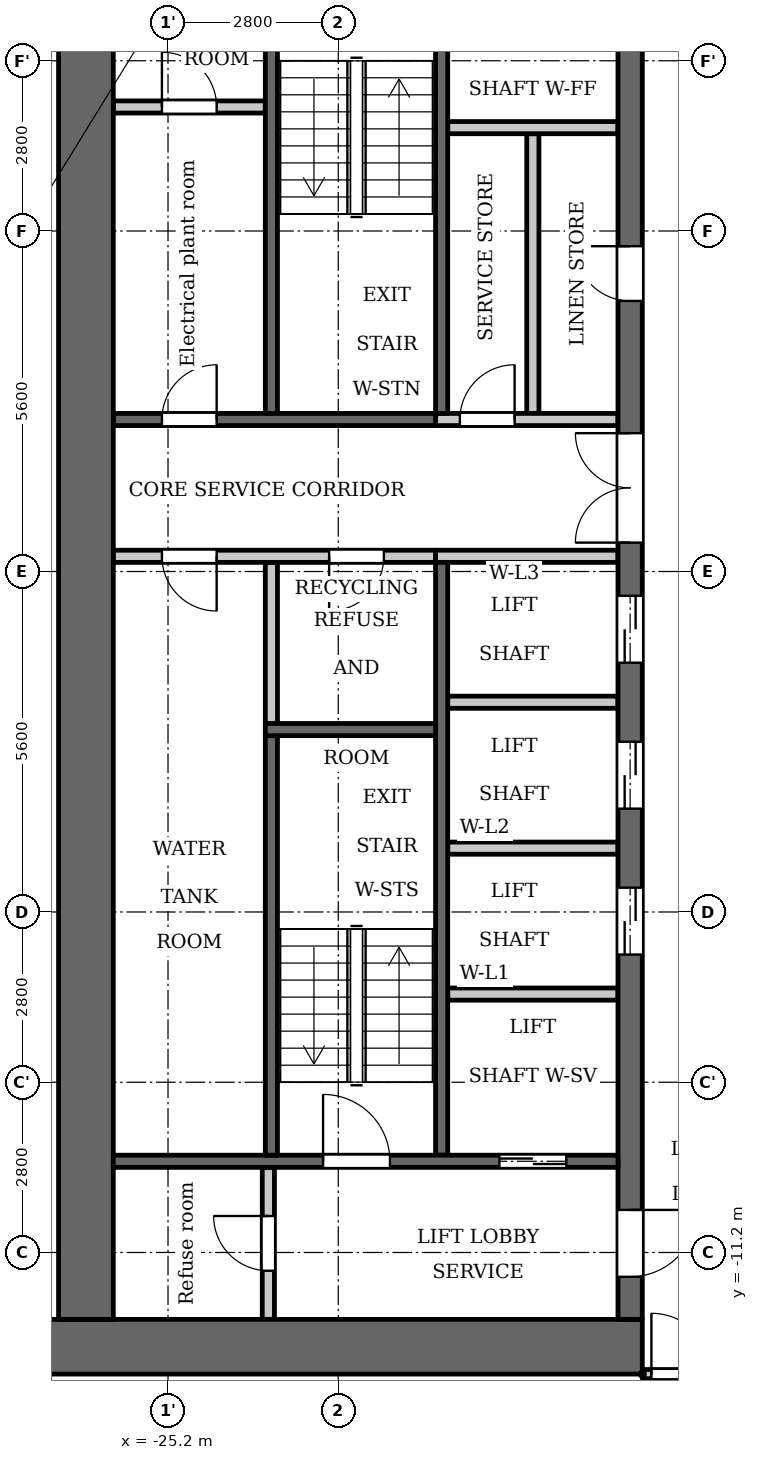
"""IFC4 building model, lengths in metres.
Left out: names, types, materials, properties, quantities, classifications, styles, units other than length and angle.
Written with IfcOpenShell. Run it as: python <this file> out.ifc"""

import sys

from ifc_helpers import new_model, si_unit, direction, frame, frame_2d, origin, place, context, subcontext, project, spatial, rectangle, extrude, element, fill, save


model = new_model("IFC4")
c1 = context("Model", 3, precision=1e-05, world=origin(), true_north=direction((0.0, 1.0)))
c2 = subcontext(c1, "Body", "Model", "MODEL_VIEW")
j1 = project(units=[si_unit("LENGTHUNIT", "METRE"), si_unit("PLANEANGLEUNIT", "RADIAN")], contexts=[c1])
p1 = place(None, origin())
s1 = spatial("IfcSite", under=j1, at=p1, CompositionType="ELEMENT")
p2 = place(p1, origin())
s2 = spatial("IfcBuilding", under=s1, at=p2, CompositionType="ELEMENT")
p3 = place(p2, frame((0.0, 0.0, 104.3)))
s3 = spatial("IfcBuildingStorey", under=s2, at=p3, CompositionType="ELEMENT", Elevation=104.3)
p4 = place(p3, frame((-23.5, -2.5, 0.0), z_axis=(0.0, 0.0, 1.0), x_axis=(0.0, 1.0, 0.0)))
e1 = element("IfcWall", 1, at=p4, inside=s3, PredefinedType="PARTITIONING", context=c2, shape_type="SweptSolid", body=[
    extrude(rectangle(XDim=2.65, YDim=0.2, at=frame_2d((1.325, 0.0))), origin(), (0.0, 0.0, 1.0), 3.2),
])
p5 = place(p3, frame((-20.7, 2.6, 0.0), z_axis=(0.0, 0.0, 1.0), x_axis=(0.0, 1.0, 0.0)))
e2 = element("IfcWall", 2, at=p5, inside=s3, PredefinedType="SHEAR", context=c2, shape_type="SweptSolid", body=[
    extrude(rectangle(XDim=7.0, YDim=0.2, at=frame_2d((3.5, 0.0))), origin(), (0.0, 0.0, 1.0), 3.2),
])
p6 = place(p3, frame((-20.7, -9.6, 0.0), z_axis=(0.0, 0.0, 1.0), x_axis=(0.0, 1.0, 0.0)))
e3 = element("IfcWall", 3, at=p6, inside=s3, PredefinedType="SHEAR", context=c2, shape_type="SweptSolid", body=[
    extrude(rectangle(XDim=9.75, YDim=0.2, at=frame_2d((4.875, 0.0))), origin(), (0.0, 0.0, 1.0), 3.2),
])
p7 = place(p3, frame((-20.8, 2.5, 0.0), z_axis=(0.0, 0.0, 1.0), x_axis=(-1.0, 0.0, 0.0)))
e4 = element("IfcWall", 4, at=p7, inside=s3, PredefinedType="SHEAR", context=c2, shape_type="SweptSolid", body=[
    extrude(rectangle(XDim=5.3, YDim=0.2, at=frame_2d((2.65, 0.0))), origin(), (0.0, 0.0, 1.0), 3.2),
])
p8 = place(p7, frame((3.6, 0.0, 0.0)))
e5 = element("IfcOpeningElement", 5, at=p8, cuts=e4, PredefinedType="OPENING", context=c2, shape_type="SweptSolid", body=[
    extrude(rectangle(XDim=0.9, YDim=2.1, at=frame_2d((0.45, 1.05))), frame((0.0, 0.11, 0.0), z_axis=(0.0, -1.0, 0.0), x_axis=(1.0, 0.0, 0.0)), (0.0, 0.0, 1.0), 0.22),
])
p9 = place(p3, frame((-20.8, 0.25, 0.0), z_axis=(0.0, 0.0, 1.0), x_axis=(-1.0, 0.0, 0.0)))
e6 = element("IfcWall", 6, at=p9, inside=s3, PredefinedType="PARTITIONING", context=c2, shape_type="SweptSolid", body=[
    extrude(rectangle(XDim=5.3, YDim=0.2, at=frame_2d((2.65, 0.0))), origin(), (0.0, 0.0, 1.0), 3.2),
])
p10 = place(p9, frame((0.85, 0.0, 0.0)))
e7 = element("IfcOpeningElement", 7, at=p10, cuts=e6, PredefinedType="OPENING", context=c2, shape_type="SweptSolid", body=[
    extrude(rectangle(XDim=0.9, YDim=2.1, at=frame_2d((0.45, 1.05))), frame((0.0, 0.11, 0.0), z_axis=(0.0, -1.0, 0.0), x_axis=(1.0, 0.0, 0.0)), (0.0, 0.0, 1.0), 0.22),
])
p11 = place(p9, frame((3.6, 0.0, 0.0)))
e8 = element("IfcOpeningElement", 8, at=p11, cuts=e6, PredefinedType="OPENING", context=c2, shape_type="SweptSolid", body=[
    extrude(rectangle(XDim=0.9, YDim=2.1, at=frame_2d((0.45, 1.05))), frame((0.0, 0.11, 0.0), z_axis=(0.0, -1.0, 0.0), x_axis=(1.0, 0.0, 0.0)), (0.0, 0.0, 1.0), 0.22),
])
p12 = place(p3, frame((-17.4, -12.75, 0.0), z_axis=(0.0, 0.0, 1.0), x_axis=(-1.0, 0.0, 0.0)))
e9 = element("IfcWall", 9, at=p12, inside=s3, PredefinedType="SHEAR", context=c2, shape_type="SweptSolid", body=[
    extrude(rectangle(XDim=10.4, YDim=0.9, at=frame_2d((5.2, 0.0))), origin(), (0.0, 0.0, 1.0), 3.2),
])
p13 = place(p3, frame((-19.2, 2.6, 0.0), z_axis=(0.0, 0.0, 1.0), x_axis=(0.0, 1.0, 0.0)))
e10 = element("IfcWall", 10, at=p13, inside=s3, PredefinedType="PARTITIONING", context=c2, shape_type="SweptSolid", body=[
    extrude(rectangle(XDim=4.6, YDim=0.2, at=frame_2d((2.3, 0.0))), origin(), (0.0, 0.0, 1.0), 3.2),
])
p14 = place(p3, frame((-17.6, -12.3, 0.0), z_axis=(0.0, 0.0, 1.0), x_axis=(0.0, 1.0, 0.0)))
e11 = element("IfcWall", 11, at=p14, inside=s3, PredefinedType="SHEAR", context=c2, shape_type="SweptSolid", body=[
    extrude(rectangle(XDim=24.6, YDim=0.4, at=frame_2d((12.3, 0.0))), origin(), (0.0, 0.0, 1.0), 3.2),
])
p15 = place(p14, frame((6.0, 0.0, 0.0)))
e12 = element("IfcOpeningElement", 12, at=p15, cuts=e11, PredefinedType="OPENING", context=c2, shape_type="SweptSolid", body=[
    extrude(rectangle(XDim=1.1, YDim=2.1, at=frame_2d((0.55, 1.05))), frame((0.0, 0.21, 0.0), z_axis=(0.0, -1.0, 0.0), x_axis=(1.0, 0.0, 0.0)), (0.0, 0.0, 1.0), 0.42),
])
p16 = place(p14, frame((8.4, 0.0, 0.0)))
e13 = element("IfcOpeningElement", 13, at=p16, cuts=e11, PredefinedType="OPENING", context=c2, shape_type="SweptSolid", body=[
    extrude(rectangle(XDim=1.1, YDim=2.1, at=frame_2d((0.55, 1.05))), frame((0.0, 0.21, 0.0), z_axis=(0.0, -1.0, 0.0), x_axis=(1.0, 0.0, 0.0)), (0.0, 0.0, 1.0), 0.42),
])
p17 = place(p14, frame((10.8, 0.0, 0.0)))
e14 = element("IfcOpeningElement", 14, at=p17, cuts=e11, PredefinedType="OPENING", context=c2, shape_type="SweptSolid", body=[
    extrude(rectangle(XDim=1.1, YDim=2.1, at=frame_2d((0.55, 1.05))), frame((0.0, 0.21, 0.0), z_axis=(0.0, -1.0, 0.0), x_axis=(1.0, 0.0, 0.0)), (0.0, 0.0, 1.0), 0.42),
])
p18 = place(p14, frame((16.75, 0.0, 0.0)))
e15 = element("IfcOpeningElement", 15, at=p18, cuts=e11, PredefinedType="OPENING", context=c2, shape_type="SweptSolid", body=[
    extrude(rectangle(XDim=0.9, YDim=2.1, at=frame_2d((0.45, 1.05))), frame((0.0, 0.21, 0.0), z_axis=(0.0, -1.0, 0.0), x_axis=(1.0, 0.0, 0.0)), (0.0, 0.0, 1.0), 0.42),
])
p19 = place(p14, frame((22.8, 0.0, 0.0)))
e16 = element("IfcOpeningElement", 16, at=p19, cuts=e11, PredefinedType="OPENING", context=c2, shape_type="SweptSolid", body=[
    extrude(rectangle(XDim=1.1, YDim=2.1, at=frame_2d((0.55, 1.05))), frame((0.0, 0.21, 0.0), z_axis=(0.0, -1.0, 0.0), x_axis=(1.0, 0.0, 0.0)), (0.0, 0.0, 1.0), 0.42),
])
p20 = place(p14, frame((0.7, 0.0, 0.0)))
e17 = element("IfcOpeningElement", 17, at=p20, cuts=e11, PredefinedType="OPENING", context=c2, shape_type="SweptSolid", body=[
    extrude(rectangle(XDim=1.1, YDim=2.1, at=frame_2d((0.55, 1.05))), frame((0.0, 0.21, 0.0), z_axis=(0.0, -1.0, 0.0), x_axis=(1.0, 0.0, 0.0)), (0.0, 0.0, 1.0), 0.42),
])
p21 = place(p14, frame((12.775, 0.0, 0.0)))
e18 = element("IfcOpeningElement", 18, at=p21, cuts=e11, PredefinedType="OPENING", context=c2, shape_type="SweptSolid", body=[
    extrude(rectangle(XDim=1.8, YDim=2.1, at=frame_2d((0.9, 1.05))), frame((0.0, 0.21, 0.0), z_axis=(0.0, -1.0, 0.0), x_axis=(1.0, 0.0, 0.0)), (0.0, 0.0, 1.0), 0.42),
])
p22 = place(p3, frame((-26.55, -12.3, 0.0), z_axis=(0.0, 0.0, 1.0), x_axis=(0.0, 1.0, 0.0)))
e19 = element("IfcWall", 19, at=p22, inside=s3, PredefinedType="SHEAR", context=c2, shape_type="SweptSolid", body=[
    extrude(rectangle(XDim=24.6, YDim=0.9, at=frame_2d((12.3, 0.0))), origin(), (0.0, 0.0, 1.0), 3.2),
])
p23 = place(p3, frame((-23.55, -12.3, 0.0), z_axis=(0.0, 0.0, 1.0), x_axis=(0.0, 1.0, 0.0)))
e20 = element("IfcWall", 20, at=p23, inside=s3, PredefinedType="PARTITIONING", context=c2, shape_type="SweptSolid", body=[
    extrude(rectangle(XDim=2.5, YDim=0.2, at=frame_2d((1.25, 0.0))), origin(), (0.0, 0.0, 1.0), 3.2),
])
p24 = place(p23, frame((0.8, 0.0, 0.0)))
e21 = element("IfcOpeningElement", 21, at=p24, cuts=e20, PredefinedType="OPENING", context=c2, shape_type="SweptSolid", body=[
    extrude(rectangle(XDim=0.9, YDim=2.1, at=frame_2d((0.45, 1.05))), frame((0.0, 0.11, 0.0), z_axis=(0.0, -1.0, 0.0), x_axis=(1.0, 0.0, 0.0)), (0.0, 0.0, 1.0), 0.22),
])
p25 = place(p3, frame((-23.6, 7.64, 0.0), z_axis=(0.0, 0.0, 1.0), x_axis=(-1.0, 0.0, 0.0)))
e22 = element("IfcWall", 22, at=p25, inside=s3, PredefinedType="PARTITIONING", context=c2, shape_type="SweptSolid", body=[
    extrude(rectangle(XDim=2.5, YDim=0.2, at=frame_2d((1.25, 0.0))), origin(), (0.0, 0.0, 1.0), 3.2),
])
p26 = place(p25, frame((0.8, 0.0, 0.0)))
e23 = element("IfcOpeningElement", 23, at=p26, cuts=e22, PredefinedType="OPENING", context=c2, shape_type="SweptSolid", body=[
    extrude(rectangle(XDim=0.9, YDim=2.1, at=frame_2d((0.45, 1.05))), frame((0.0, 0.11, 0.0), z_axis=(0.0, -1.0, 0.0), x_axis=(1.0, 0.0, 0.0)), (0.0, 0.0, 1.0), 0.22),
])
p27 = place(p3, frame((-17.8, -9.7, 0.0), z_axis=(0.0, 0.0, 1.0), x_axis=(-1.0, 0.0, 0.0)))
e24 = element("IfcWall", 24, at=p27, inside=s3, PredefinedType="SHEAR", context=c2, shape_type="SweptSolid", body=[
    extrude(rectangle(XDim=8.3, YDim=0.2, at=frame_2d((4.15, 0.0))), origin(), (0.0, 0.0, 1.0), 3.2),
])
p28 = place(p27, frame((0.85, 0.0, 0.0)))
e25 = element("IfcOpeningElement", 25, at=p28, cuts=e24, PredefinedType="OPENING", context=c2, shape_type="SweptSolid", body=[
    extrude(rectangle(XDim=1.1, YDim=2.1, at=frame_2d((0.55, 1.05))), frame((0.0, 0.11, 0.0), z_axis=(0.0, -1.0, 0.0), x_axis=(1.0, 0.0, 0.0)), (0.0, 0.0, 1.0), 0.22),
])
p29 = place(p27, frame((3.75, 0.0, 0.0)))
e26 = element("IfcOpeningElement", 26, at=p29, cuts=e24, PredefinedType="OPENING", context=c2, shape_type="SweptSolid", body=[
    extrude(rectangle(XDim=1.1, YDim=2.1, at=frame_2d((0.55, 1.05))), frame((0.0, 0.11, 0.0), z_axis=(0.0, -1.0, 0.0), x_axis=(1.0, 0.0, 0.0)), (0.0, 0.0, 1.0), 0.22),
])
for number, where, z_axis, x_axis in (
    (27, (-17.8, -6.95, 0.0), (0.0, 0.0, 1.0), (-1.0, 0.0, 0.0)),
    (28, (-17.8, -4.55, 0.0), (0.0, 0.0, 1.0), (-1.0, 0.0, 0.0)),
    (29, (-17.8, -2.15, 0.0), (0.0, 0.0, 1.0), (-1.0, 0.0, 0.0)),
):
    element("IfcWall", number, at=place(p3, frame(where, z_axis=z_axis, x_axis=x_axis)), inside=s3, PredefinedType="PARTITIONING", context=c2, shape_type="SweptSolid", body=[
        extrude(rectangle(XDim=2.8, YDim=0.2, at=frame_2d((1.4, 0.0))), origin(), (0.0, 0.0, 1.0), 3.2),
    ])
p30 = place(p3, frame((-17.8, 0.25, 0.0), z_axis=(0.0, 0.0, 1.0), x_axis=(-1.0, 0.0, 0.0)))
e30 = element("IfcWall", 30, at=p30, inside=s3, PredefinedType="PARTITIONING", context=c2, shape_type="SweptSolid", body=[
    extrude(rectangle(XDim=3.0, YDim=0.2, at=frame_2d((1.5, 0.0))), origin(), (0.0, 0.0, 1.0), 3.2),
])
p31 = place(p3, frame((-17.8, 2.5, 0.0), z_axis=(0.0, 0.0, 1.0), x_axis=(-1.0, 0.0, 0.0)))
e31 = element("IfcWall", 31, at=p31, inside=s3, PredefinedType="PARTITIONING", context=c2, shape_type="SweptSolid", body=[
    extrude(rectangle(XDim=3.0, YDim=0.2, at=frame_2d((1.5, 0.0))), origin(), (0.0, 0.0, 1.0), 3.2),
])
p32 = place(p31, frame((1.7, 0.0, 0.0)))
e32 = element("IfcOpeningElement", 32, at=p32, cuts=e31, PredefinedType="OPENING", context=c2, shape_type="SweptSolid", body=[
    extrude(rectangle(XDim=0.9, YDim=2.1, at=frame_2d((0.45, 1.05))), frame((0.0, 0.11, 0.0), z_axis=(0.0, -1.0, 0.0), x_axis=(1.0, 0.0, 0.0)), (0.0, 0.0, 1.0), 0.22),
])
p33 = place(p3, frame((-17.8, 7.3, 0.0), z_axis=(0.0, 0.0, 1.0), x_axis=(-1.0, 0.0, 0.0)))
e33 = element("IfcWall", 33, at=p33, inside=s3, PredefinedType="PARTITIONING", context=c2, shape_type="SweptSolid", body=[
    extrude(rectangle(XDim=2.8, YDim=0.2, at=frame_2d((1.4, 0.0))), origin(), (0.0, 0.0, 1.0), 3.2),
])
p34 = place(p3, frame((-23.5, 2.6, 0.0), z_axis=(0.0, 0.0, 1.0), x_axis=(0.0, 1.0, 0.0)))
e34 = element("IfcWall", 34, at=p34, inside=s3, PredefinedType="SHEAR", context=c2, shape_type="SweptSolid", body=[
    extrude(rectangle(XDim=7.0, YDim=0.2, at=frame_2d((3.5, 0.0))), origin(), (0.0, 0.0, 1.0), 3.2),
])
p35 = place(p3, frame((-23.5, -9.6, 0.0), z_axis=(0.0, 0.0, 1.0), x_axis=(0.0, 1.0, 0.0)))
e35 = element("IfcWall", 35, at=p35, inside=s3, PredefinedType="SHEAR", context=c2, shape_type="SweptSolid", body=[
    extrude(rectangle(XDim=6.9, YDim=0.2, at=frame_2d((3.45, 0.0))), origin(), (0.0, 0.0, 1.0), 3.2),
])
p36 = place(p3, frame((-20.8, -2.6, 0.0), z_axis=(0.0, 0.0, 1.0), x_axis=(-1.0, 0.0, 0.0)))
e36 = element("IfcWall", 36, at=p36, inside=s3, PredefinedType="SHEAR", context=c2, shape_type="SweptSolid", body=[
    extrude(rectangle(XDim=2.8, YDim=0.2, at=frame_2d((1.4, 0.0))), origin(), (0.0, 0.0, 1.0), 3.2),
])
p37 = place(p3, frame((-17.4, -13.2, 0.0), z_axis=(0.0, 0.0, 1.0), x_axis=(1.0, 0.0, 0.0)))
e37 = element("IfcWall", 37, at=p37, inside=s3, PredefinedType="PARTITIONING", context=c2, shape_type="SweptSolid", body=[
    extrude(rectangle(XDim=34.8, YDim=0.15, at=frame_2d((17.4, 0.0))), origin(), (0.0, 0.0, 1.0), 3.2),
])
p38 = place(p37, frame((0.15, 0.0, 0.0)))
e38 = element("IfcOpeningElement", 38, at=p38, cuts=e37, PredefinedType="OPENING", context=c2, shape_type="SweptSolid", body=[
    extrude(rectangle(XDim=1.0, YDim=2.1, at=frame_2d((0.5, 1.05))), frame((0.0, 0.085, 0.0), z_axis=(0.0, -1.0, 0.0), x_axis=(1.0, 0.0, 0.0)), (0.0, 0.0, 1.0), 0.17),
])
p39 = place(p37, frame((33.55, 0.0, 0.0)))
e39 = element("IfcOpeningElement", 39, at=p39, cuts=e37, PredefinedType="OPENING", context=c2, shape_type="SweptSolid", body=[
    extrude(rectangle(XDim=1.0, YDim=2.1, at=frame_2d((0.5, 1.05))), frame((0.0, 0.085, 0.0), z_axis=(0.0, -1.0, 0.0), x_axis=(1.0, 0.0, 0.0)), (0.0, 0.0, 1.0), 0.17),
])
p40 = place(p37, frame((8.1, 0.0, 0.0)))
e40 = element("IfcOpeningElement", 40, at=p40, cuts=e37, PredefinedType="OPENING", context=c2, shape_type="SweptSolid", body=[
    extrude(rectangle(XDim=1.0, YDim=2.1, at=frame_2d((0.5, 1.05))), frame((0.0, 0.085, 0.0), z_axis=(0.0, -1.0, 0.0), x_axis=(1.0, 0.0, 0.0)), (0.0, 0.0, 1.0), 0.17),
])
p41 = place(p37, frame((12.45, 0.0, 0.0)))
e41 = element("IfcOpeningElement", 41, at=p41, cuts=e37, PredefinedType="OPENING", context=c2, shape_type="SweptSolid", body=[
    extrude(rectangle(XDim=1.0, YDim=2.1, at=frame_2d((0.5, 1.05))), frame((0.0, 0.085, 0.0), z_axis=(0.0, -1.0, 0.0), x_axis=(1.0, 0.0, 0.0)), (0.0, 0.0, 1.0), 0.17),
])
p42 = place(p37, frame((19.05, 0.0, 0.0)))
e42 = element("IfcOpeningElement", 42, at=p42, cuts=e37, PredefinedType="OPENING", context=c2, shape_type="SweptSolid", body=[
    extrude(rectangle(XDim=1.0, YDim=2.1, at=frame_2d((0.5, 1.05))), frame((0.0, 0.085, 0.0), z_axis=(0.0, -1.0, 0.0), x_axis=(1.0, 0.0, 0.0)), (0.0, 0.0, 1.0), 0.17),
])
p43 = place(p37, frame((24.9, 0.0, 0.0)))
e43 = element("IfcOpeningElement", 43, at=p43, cuts=e37, PredefinedType="OPENING", context=c2, shape_type="SweptSolid", body=[
    extrude(rectangle(XDim=1.0, YDim=2.1, at=frame_2d((0.5, 1.05))), frame((0.0, 0.085, 0.0), z_axis=(0.0, -1.0, 0.0), x_axis=(1.0, 0.0, 0.0)), (0.0, 0.0, 1.0), 0.17),
])
p44 = place(p28, origin())
e44 = element("IfcDoor", 44, at=p44, inside=s3, OperationType="DOUBLE_DOOR_SLIDING", PredefinedType="DOOR", context=c2, shape_type="SweptSolid", body=[
    extrude(rectangle(XDim=1.1, YDim=2.1, at=frame_2d((0.55, 1.05))), frame((0.0, 0.025, 0.0), z_axis=(0.0, -1.0, 0.0), x_axis=(1.0, 0.0, 0.0)), (0.0, 0.0, 1.0), 0.05),
])
fill(e25, e44)
p45 = place(p15, origin())
e45 = element("IfcDoor", 45, at=p45, inside=s3, OperationType="DOUBLE_DOOR_SLIDING", PredefinedType="DOOR", context=c2, shape_type="SweptSolid", body=[
    extrude(rectangle(XDim=1.1, YDim=2.1, at=frame_2d((0.55, 1.05))), frame((0.0, 0.025, 0.0), z_axis=(0.0, -1.0, 0.0), x_axis=(1.0, 0.0, 0.0)), (0.0, 0.0, 1.0), 0.05),
])
fill(e12, e45)
p46 = place(p16, origin())
e46 = element("IfcDoor", 46, at=p46, inside=s3, OperationType="DOUBLE_DOOR_SLIDING", PredefinedType="DOOR", context=c2, shape_type="SweptSolid", body=[
    extrude(rectangle(XDim=1.1, YDim=2.1, at=frame_2d((0.55, 1.05))), frame((0.0, 0.025, 0.0), z_axis=(0.0, -1.0, 0.0), x_axis=(1.0, 0.0, 0.0)), (0.0, 0.0, 1.0), 0.05),
])
fill(e13, e46)
p47 = place(p17, origin())
e47 = element("IfcDoor", 47, at=p47, inside=s3, OperationType="DOUBLE_DOOR_SLIDING", PredefinedType="DOOR", context=c2, shape_type="SweptSolid", body=[
    extrude(rectangle(XDim=1.1, YDim=2.1, at=frame_2d((0.55, 1.05))), frame((0.0, 0.025, 0.0), z_axis=(0.0, -1.0, 0.0), x_axis=(1.0, 0.0, 0.0)), (0.0, 0.0, 1.0), 0.05),
])
fill(e14, e47)
p48 = place(p18, origin())
e48 = element("IfcDoor", 48, at=p48, inside=s3, OperationType="SINGLE_SWING_LEFT", PredefinedType="DOOR", context=c2, shape_type="SweptSolid", body=[
    extrude(rectangle(XDim=0.9, YDim=2.1, at=frame_2d((0.45, 1.05))), frame((0.0, 0.025, 0.0), z_axis=(0.0, -1.0, 0.0), x_axis=(1.0, 0.0, 0.0)), (0.0, 0.0, 1.0), 0.05),
])
fill(e15, e48)
p49 = place(p32, origin())
e49 = element("IfcDoor", 49, at=p49, inside=s3, OperationType="SINGLE_SWING_LEFT", PredefinedType="DOOR", context=c2, shape_type="SweptSolid", body=[
    extrude(rectangle(XDim=0.9, YDim=2.1, at=frame_2d((0.45, 1.05))), frame((0.0, 0.025, 0.0), z_axis=(0.0, -1.0, 0.0), x_axis=(1.0, 0.0, 0.0)), (0.0, 0.0, 1.0), 0.05),
])
fill(e32, e49)
p50 = place(p20, origin())
e50 = element("IfcDoor", 50, at=p50, inside=s3, OperationType="SINGLE_SWING_RIGHT", PredefinedType="DOOR", context=c2, shape_type="SweptSolid", body=[
    extrude(rectangle(XDim=1.1, YDim=2.1, at=frame_2d((0.55, 1.05))), frame((0.0, 0.025, 0.0), z_axis=(0.0, -1.0, 0.0), x_axis=(1.0, 0.0, 0.0)), (0.0, 0.0, 1.0), 0.05),
])
fill(e17, e50)
p51 = place(p24, origin())
e51 = element("IfcDoor", 51, at=p51, inside=s3, OperationType="SINGLE_SWING_LEFT", PredefinedType="DOOR", context=c2, shape_type="SweptSolid", body=[
    extrude(rectangle(XDim=0.9, YDim=2.1, at=frame_2d((0.45, 1.05))), frame((0.0, 0.025, 0.0), z_axis=(0.0, -1.0, 0.0), x_axis=(1.0, 0.0, 0.0)), (0.0, 0.0, 1.0), 0.05),
])
fill(e21, e51)
p52 = place(p29, origin())
e52 = element("IfcDoor", 52, at=p52, inside=s3, OperationType="SINGLE_SWING_RIGHT", PredefinedType="DOOR", context=c2, shape_type="SweptSolid", body=[
    extrude(rectangle(XDim=1.1, YDim=2.1, at=frame_2d((0.55, 1.05))), frame((0.0, 0.025, 0.0), z_axis=(0.0, -1.0, 0.0), x_axis=(1.0, 0.0, 0.0)), (0.0, 0.0, 1.0), 0.05),
])
fill(e26, e52)
p53 = place(p21, origin())
e53 = element("IfcDoor", 53, at=p53, inside=s3, OperationType="DOUBLE_DOOR_SINGLE_SWING", PredefinedType="DOOR", context=c2, shape_type="SweptSolid", body=[
    extrude(rectangle(XDim=1.8, YDim=2.1, at=frame_2d((0.9, 1.05))), frame((0.0, 0.025, 0.0), z_axis=(0.0, -1.0, 0.0), x_axis=(1.0, 0.0, 0.0)), (0.0, 0.0, 1.0), 0.05),
])
fill(e18, e53)
p54 = place(p10, origin())
e54 = element("IfcDoor", 54, at=p54, inside=s3, OperationType="SINGLE_SWING_LEFT", PredefinedType="DOOR", context=c2, shape_type="SweptSolid", body=[
    extrude(rectangle(XDim=0.9, YDim=2.1, at=frame_2d((0.45, 1.05))), frame((0.0, 0.025, 0.0), z_axis=(0.0, -1.0, 0.0), x_axis=(1.0, 0.0, 0.0)), (0.0, 0.0, 1.0), 0.05),
])
fill(e7, e54)
p55 = place(p11, origin())
e55 = element("IfcDoor", 55, at=p55, inside=s3, OperationType="SINGLE_SWING_RIGHT", PredefinedType="DOOR", context=c2, shape_type="SweptSolid", body=[
    extrude(rectangle(XDim=0.9, YDim=2.1, at=frame_2d((0.45, 1.05))), frame((0.0, 0.025, 0.0), z_axis=(0.0, -1.0, 0.0), x_axis=(1.0, 0.0, 0.0)), (0.0, 0.0, 1.0), 0.05),
])
fill(e8, e55)
p56 = place(p26, origin())
e56 = element("IfcDoor", 56, at=p56, inside=s3, OperationType="SINGLE_SWING_RIGHT", PredefinedType="DOOR", context=c2, shape_type="SweptSolid", body=[
    extrude(rectangle(XDim=0.9, YDim=2.1, at=frame_2d((0.45, 1.05))), frame((0.0, 0.025, 0.0), z_axis=(0.0, -1.0, 0.0), x_axis=(1.0, 0.0, 0.0)), (0.0, 0.0, 1.0), 0.05),
])
fill(e23, e56)
p57 = place(p8, origin())
e57 = element("IfcDoor", 57, at=p57, inside=s3, OperationType="SINGLE_SWING_LEFT", PredefinedType="DOOR", context=c2, shape_type="SweptSolid", body=[
    extrude(rectangle(XDim=0.9, YDim=2.1, at=frame_2d((0.45, 1.05))), frame((0.0, 0.025, 0.0), z_axis=(0.0, -1.0, 0.0), x_axis=(1.0, 0.0, 0.0)), (0.0, 0.0, 1.0), 0.05),
])
fill(e5, e57)
p58 = place(p38, origin())
e58 = element("IfcDoor", 58, at=p58, inside=s3, OperationType="SINGLE_SWING_RIGHT", PredefinedType="DOOR", context=c2, shape_type="SweptSolid", body=[
    extrude(rectangle(XDim=1.0, YDim=2.1, at=frame_2d((0.5, 1.05))), frame((0.0, 0.025, 0.0), z_axis=(0.0, -1.0, 0.0), x_axis=(1.0, 0.0, 0.0)), (0.0, 0.0, 1.0), 0.05),
])
fill(e38, e58)
save(model, sys.argv[1])
